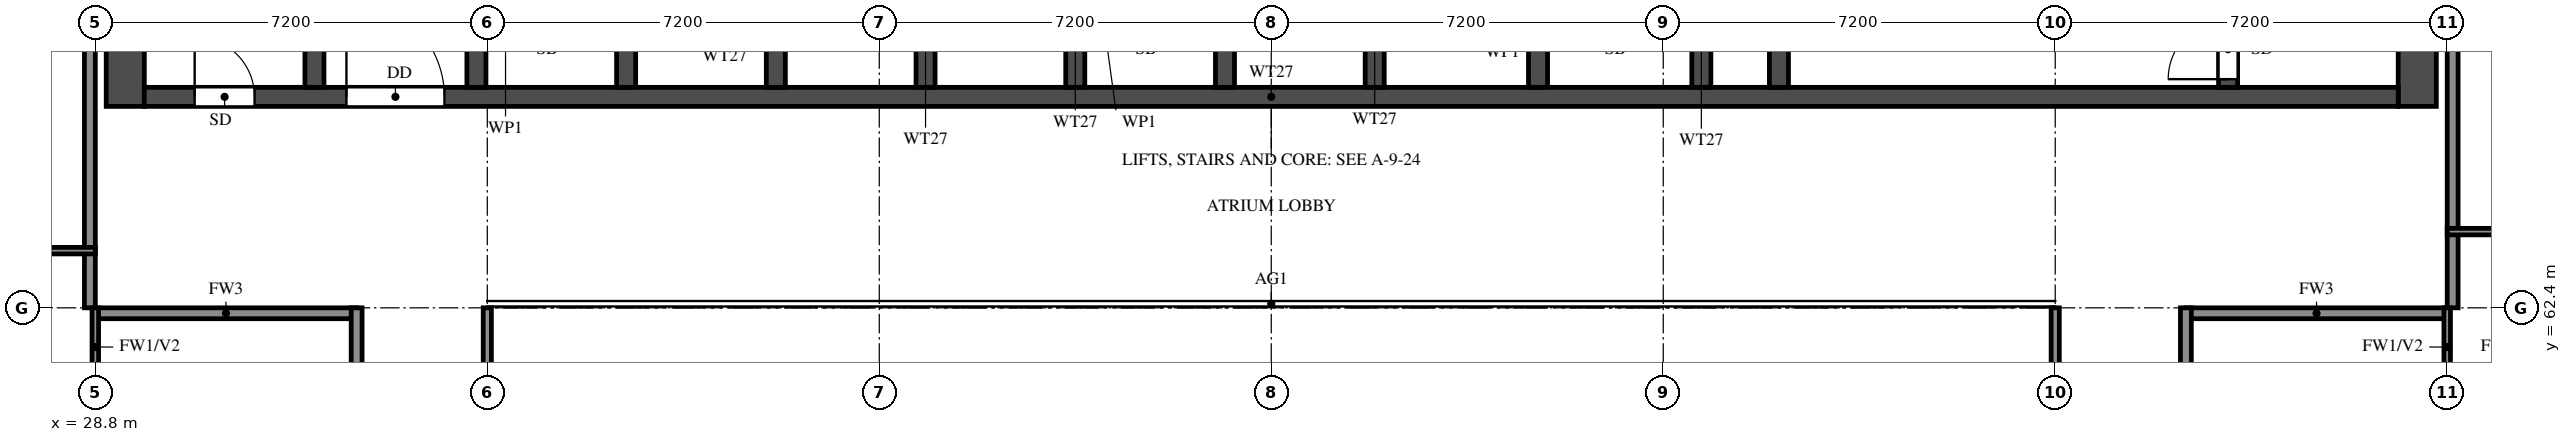
"""IFC4 building model, lengths in metres.
Left out: names, types, materials, properties, quantities, classifications, styles, units other than length and angle.
Written with IfcOpenShell. Run it as: python <this file> out.ifc"""

import sys

from ifc_helpers import new_model, si_unit, direction, frame, frame_2d, origin, place, context, subcontext, project, spatial, rectangle, extrude, element, fill, save


model = new_model("IFC4")
c1 = context("Model", 3, precision=1e-05, world=origin(), true_north=direction((0.0, 1.0)))
c2 = subcontext(c1, "Body", "Model", "MODEL_VIEW")
j1 = project(units=[si_unit("LENGTHUNIT", "METRE"), si_unit("PLANEANGLEUNIT", "RADIAN")], contexts=[c1])
p1 = place(None, origin())
s1 = spatial("IfcSite", under=j1, at=p1, CompositionType="ELEMENT")
p2 = place(p1, origin())
s2 = spatial("IfcBuilding", under=s1, at=p2, CompositionType="ELEMENT")
p3 = place(p2, frame((0.0, 0.0, 181.5)))
s3 = spatial("IfcBuildingStorey", under=s2, at=p3, CompositionType="ELEMENT", Elevation=181.5)
for number, where, z_axis, x_axis in (
    (1, (29.35, 66.1, 0.0), (0.0, 0.0, 1.0), (0.0, 1.0, 0.0)),
    (2, (71.45, 66.1, 0.0), (0.0, 0.0, 1.0), (0.0, 1.0, 0.0)),
):
    element("IfcWall", number, at=place(p3, frame(where, z_axis=z_axis, x_axis=x_axis)), inside=s3, PredefinedType="SHEAR", context=c2, shape_type="SweptSolid", body=[
        extrude(rectangle(XDim=11.9, YDim=0.7, at=frame_2d((5.95, 0.0))), origin(), (0.0, 0.0, 1.0), 3.2),
    ])
p4 = place(p3, frame((29.7, 66.275, 0.0), z_axis=(0.0, 0.0, 1.0), x_axis=(1.0, 0.0, 0.0)))
e3 = element("IfcWall", 3, at=p4, inside=s3, PredefinedType="SHEAR", context=c2, shape_type="SweptSolid", body=[
    extrude(rectangle(XDim=41.4, YDim=0.35, at=frame_2d((20.7, 0.0))), origin(), (0.0, 0.0, 1.0), 3.2),
])
p5 = place(p4, frame((0.925, 0.0, 0.0)))
e4 = element("IfcOpeningElement", 4, at=p5, cuts=e3, PredefinedType="OPENING", context=c2, shape_type="SweptSolid", body=[
    extrude(rectangle(XDim=1.1, YDim=2.1, at=frame_2d((0.55, 1.05))), frame((0.0, 0.185, 0.0), z_axis=(0.0, -1.0, 0.0), x_axis=(1.0, 0.0, 0.0)), (0.0, 0.0, 1.0), 0.37),
])
p6 = place(p4, frame((3.712, 0.0, 0.0)))
e5 = element("IfcOpeningElement", 5, at=p6, cuts=e3, PredefinedType="OPENING", context=c2, shape_type="SweptSolid", body=[
    extrude(rectangle(XDim=1.8, YDim=2.1, at=frame_2d((0.9, 1.05))), frame((0.0, 0.185, 0.0), z_axis=(0.0, -1.0, 0.0), x_axis=(1.0, 0.0, 0.0)), (0.0, 0.0, 1.0), 0.37),
])
p7 = place(p3, frame((32.825, 66.45, 0.0), z_axis=(0.0, 0.0, 1.0), x_axis=(0.0, 1.0, 0.0)))
e6 = element("IfcWall", 6, at=p7, inside=s3, PredefinedType="SHEAR", context=c2, shape_type="SweptSolid", body=[
    extrude(rectangle(XDim=10.85, YDim=0.35, at=frame_2d((5.425, 0.0))), origin(), (0.0, 0.0, 1.0), 3.2),
])
p8 = place(p3, frame((67.975, 66.45, 0.0), z_axis=(0.0, 0.0, 1.0), x_axis=(0.0, 1.0, 0.0)))
e7 = element("IfcWall", 7, at=p8, inside=s3, PredefinedType="SHEAR", context=c2, shape_type="SweptSolid", body=[
    extrude(rectangle(XDim=10.85, YDim=0.35, at=frame_2d((5.425, 0.0))), origin(), (0.0, 0.0, 1.0), 3.2),
])
p9 = place(p8, frame((0.15, 0.0, 0.0)))
e8 = element("IfcOpeningElement", 8, at=p9, cuts=e7, PredefinedType="OPENING", context=c2, shape_type="SweptSolid", body=[
    extrude(rectangle(XDim=1.1, YDim=2.1, at=frame_2d((0.55, 1.05))), frame((0.0, 0.185, 0.0), z_axis=(0.0, -1.0, 0.0), x_axis=(1.0, 0.0, 0.0)), (0.0, 0.0, 1.0), 0.37),
])
p10 = place(p3, frame((59.725, 66.45, 0.0), z_axis=(0.0, 0.0, 1.0), x_axis=(0.0, 1.0, 0.0)))
e9 = element("IfcWall", 9, at=p10, inside=s3, PredefinedType="SHEAR", context=c2, shape_type="SweptSolid", body=[
    extrude(rectangle(XDim=6.125, YDim=0.35, at=frame_2d((3.062, 0.0))), origin(), (0.0, 0.0, 1.0), 3.2),
])
p11 = place(p10, frame((3.85, 0.0, 0.0)))
e10 = element("IfcOpeningElement", 10, at=p11, cuts=e9, PredefinedType="OPENING", context=c2, shape_type="SweptSolid", body=[
    extrude(rectangle(XDim=1.2, YDim=2.1, at=frame_2d((0.6, 1.05))), frame((0.0, 0.185, 0.0), z_axis=(0.0, -1.0, 0.0), x_axis=(1.0, 0.0, 0.0)), (0.0, 0.0, 1.0), 0.37),
])
for number, where, z_axis, x_axis in (
    (11, (35.8, 66.45, 0.0), (0.0, 0.0, 1.0), (0.0, 1.0, 0.0)),
    (12, (38.55, 66.45, 0.0), (0.0, 0.0, 1.0), (0.0, 1.0, 0.0)),
    (13, (41.3, 66.45, 0.0), (0.0, 0.0, 1.0), (0.0, 1.0, 0.0)),
    (14, (44.05, 66.45, 0.0), (0.0, 0.0, 1.0), (0.0, 1.0, 0.0)),
    (15, (46.8, 66.45, 0.0), (0.0, 0.0, 1.0), (0.0, 1.0, 0.0)),
    (16, (49.55, 66.45, 0.0), (0.0, 0.0, 1.0), (0.0, 1.0, 0.0)),
    (17, (52.3, 66.45, 0.0), (0.0, 0.0, 1.0), (0.0, 1.0, 0.0)),
    (18, (55.3, 66.45, 0.0), (0.0, 0.0, 1.0), (0.0, 1.0, 0.0)),
    (19, (58.3, 66.45, 0.0), (0.0, 0.0, 1.0), (0.0, 1.0, 0.0)),
):
    element("IfcWall", number, at=place(p3, frame(where, z_axis=z_axis, x_axis=x_axis)), inside=s3, PredefinedType="SHEAR", context=c2, shape_type="SweptSolid", body=[
        extrude(rectangle(XDim=2.425, YDim=0.35, at=frame_2d((1.212, 0.0))), origin(), (0.0, 0.0, 1.0), 3.2),
    ])
for number, where, z_axis, x_axis in (
    (20, (28.8, 62.3, 0.0), (0.0, 0.0, 1.0), (1.0, 0.0, 0.0)),
    (21, (67.2, 62.3, 0.0), (0.0, 0.0, 1.0), (1.0, 0.0, 0.0)),
):
    element("IfcWall", number, at=place(p3, frame(where, z_axis=z_axis, x_axis=x_axis)), inside=s3, PredefinedType="SOLIDWALL", context=c2, shape_type="SweptSolid", body=[
        extrude(rectangle(XDim=4.8, YDim=0.2, at=frame_2d((2.4, 0.0))), origin(), (0.0, 0.0, 1.0), 3.2),
    ])
p12 = place(p3, frame((28.7, 62.4, 0.0), z_axis=(0.0, 0.0, 1.0), x_axis=(0.0, 1.0, 0.0)))
e22 = element("IfcWall", 22, at=p12, inside=s3, PredefinedType="SOLIDWALL", context=c2, shape_type="SweptSolid", body=[
    extrude(rectangle(XDim=15.6, YDim=0.2, at=frame_2d((7.8, 0.0))), origin(), (0.0, 0.0, 1.0), 3.2),
])
p13 = place(p3, frame((33.6, 56.4, 0.0), z_axis=(0.0, 0.0, 1.0), x_axis=(0.0, 1.0, 0.0)))
e23 = element("IfcWall", 23, at=p13, inside=s3, PredefinedType="SOLIDWALL", context=c2, shape_type="SweptSolid", body=[
    extrude(rectangle(XDim=6.0, YDim=0.2, at=frame_2d((3.0, 0.0))), origin(), (0.0, 0.0, 1.0), 3.2),
])
p14 = place(p13, frame((3.7, 0.0, 0.0)))
e24 = element("IfcOpeningElement", 24, at=p14, cuts=e23, PredefinedType="OPENING", context=c2, shape_type="SweptSolid", body=[
    extrude(rectangle(XDim=1.0, YDim=2.1, at=frame_2d((0.5, 1.05))), frame((0.0, 0.11, 0.0), z_axis=(0.0, -1.0, 0.0), x_axis=(1.0, 0.0, 0.0)), (0.0, 0.0, 1.0), 0.22),
])
p15 = place(p3, frame((67.2, 56.4, 0.0), z_axis=(0.0, 0.0, 1.0), x_axis=(0.0, 1.0, 0.0)))
e25 = element("IfcWall", 25, at=p15, inside=s3, PredefinedType="SOLIDWALL", context=c2, shape_type="SweptSolid", body=[
    extrude(rectangle(XDim=6.0, YDim=0.2, at=frame_2d((3.0, 0.0))), origin(), (0.0, 0.0, 1.0), 3.2),
])
p16 = place(p15, frame((3.7, 0.0, 0.0)))
e26 = element("IfcOpeningElement", 26, at=p16, cuts=e25, PredefinedType="OPENING", context=c2, shape_type="SweptSolid", body=[
    extrude(rectangle(XDim=1.0, YDim=2.1, at=frame_2d((0.5, 1.05))), frame((0.0, 0.11, 0.0), z_axis=(0.0, -1.0, 0.0), x_axis=(1.0, 0.0, 0.0)), (0.0, 0.0, 1.0), 0.22),
])
p17 = place(p3, frame((72.1, 62.4, 0.0), z_axis=(0.0, 0.0, 1.0), x_axis=(0.0, 1.0, 0.0)))
e27 = element("IfcWall", 27, at=p17, inside=s3, PredefinedType="SOLIDWALL", context=c2, shape_type="SweptSolid", body=[
    extrude(rectangle(XDim=15.6, YDim=0.2, at=frame_2d((7.8, 0.0))), origin(), (0.0, 0.0, 1.0), 3.2),
])
for number, where, z_axis, x_axis in (
    (28, (23.7, 63.45, 0.0), (0.0, 0.0, 1.0), (1.0, 0.0, 0.0)),
    (29, (72.0, 63.8, 0.0), (0.0, 0.0, 1.0), (1.0, 0.0, 0.0)),
):
    element("IfcWall", number, at=place(p3, frame(where, z_axis=z_axis, x_axis=x_axis)), inside=s3, PredefinedType="PARTITIONING", context=c2, shape_type="SweptSolid", body=[
        extrude(rectangle(XDim=5.1, YDim=0.12, at=frame_2d((2.55, 0.0))), origin(), (0.0, 0.0, 1.0), 3.2),
    ])
p18 = place(p3, frame((28.8, 58.8, 0.0), z_axis=(0.0, 0.0, 1.0), x_axis=(0.0, 1.0, 0.0)))
e30 = element("IfcWall", 30, at=p18, inside=s3, PredefinedType="PARTITIONING", context=c2, shape_type="SweptSolid", body=[
    extrude(rectangle(XDim=3.6, YDim=0.12, at=frame_2d((1.8, 0.0))), origin(), (0.0, 0.0, 1.0), 3.2),
])
p19 = place(p18, frame((0.75, 0.0, 0.0)))
e31 = element("IfcOpeningElement", 31, at=p19, cuts=e30, PredefinedType="OPENING", context=c2, shape_type="SweptSolid", body=[
    extrude(rectangle(XDim=0.9, YDim=2.1, at=frame_2d((0.45, 1.05))), frame((0.0, 0.07, 0.0), z_axis=(0.0, -1.0, 0.0), x_axis=(1.0, 0.0, 0.0)), (0.0, 0.0, 1.0), 0.14),
])
p20 = place(p3, frame((72.0, 58.8, 0.0), z_axis=(0.0, 0.0, 1.0), x_axis=(0.0, 1.0, 0.0)))
e32 = element("IfcWall", 32, at=p20, inside=s3, PredefinedType="PARTITIONING", context=c2, shape_type="SweptSolid", body=[
    extrude(rectangle(XDim=3.6, YDim=0.12, at=frame_2d((1.8, 0.0))), origin(), (0.0, 0.0, 1.0), 3.2),
])
p21 = place(p20, frame((0.75, 0.0, 0.0)))
e33 = element("IfcOpeningElement", 33, at=p21, cuts=e32, PredefinedType="OPENING", context=c2, shape_type="SweptSolid", body=[
    extrude(rectangle(XDim=0.9, YDim=2.1, at=frame_2d((0.45, 1.05))), frame((0.0, 0.07, 0.0), z_axis=(0.0, -1.0, 0.0), x_axis=(1.0, 0.0, 0.0)), (0.0, 0.0, 1.0), 0.14),
])
for number, where, z_axis, x_axis in (
    (34, (36.0, 48.0, 0.0), (0.0, 0.0, 1.0), (0.0, 1.0, 0.0)),
    (35, (64.8, 48.0, 0.0), (0.0, 0.0, 1.0), (0.0, 1.0, 0.0)),
):
    element("IfcWall", number, at=place(p3, frame(where, z_axis=z_axis, x_axis=x_axis)), inside=s3, PredefinedType="SOLIDWALL", context=c2, shape_type="SweptSolid", body=[
        extrude(rectangle(XDim=14.4, YDim=0.15, at=frame_2d((7.2, 0.0))), origin(), (0.0, 0.0, 1.0), 2.3),
    ])
p22 = place(p5, origin())
e36 = element("IfcDoor", 36, at=p22, inside=s3, OperationType="SINGLE_SWING_LEFT", PredefinedType="DOOR", context=c2, shape_type="SweptSolid", body=[
    extrude(rectangle(XDim=1.1, YDim=2.1, at=frame_2d((0.55, 1.05))), frame((0.0, 0.025, 0.0), z_axis=(0.0, -1.0, 0.0), x_axis=(1.0, 0.0, 0.0)), (0.0, 0.0, 1.0), 0.05),
])
fill(e4, e36)
p23 = place(p9, origin())
e37 = element("IfcDoor", 37, at=p23, inside=s3, OperationType="SINGLE_SWING_LEFT", PredefinedType="DOOR", context=c2, shape_type="SweptSolid", body=[
    extrude(rectangle(XDim=1.1, YDim=2.1, at=frame_2d((0.55, 1.05))), frame((0.0, 0.025, 0.0), z_axis=(0.0, -1.0, 0.0), x_axis=(1.0, 0.0, 0.0)), (0.0, 0.0, 1.0), 0.05),
])
fill(e8, e37)
p24 = place(p6, origin())
e38 = element("IfcDoor", 38, at=p24, inside=s3, OperationType="DOUBLE_DOOR_SINGLE_SWING", PredefinedType="DOOR", context=c2, shape_type="SweptSolid", body=[
    extrude(rectangle(XDim=1.8, YDim=2.1, at=frame_2d((0.9, 1.05))), frame((0.0, 0.025, 0.0), z_axis=(0.0, -1.0, 0.0), x_axis=(1.0, 0.0, 0.0)), (0.0, 0.0, 1.0), 0.05),
])
fill(e5, e38)
save(model, sys.argv[1])
